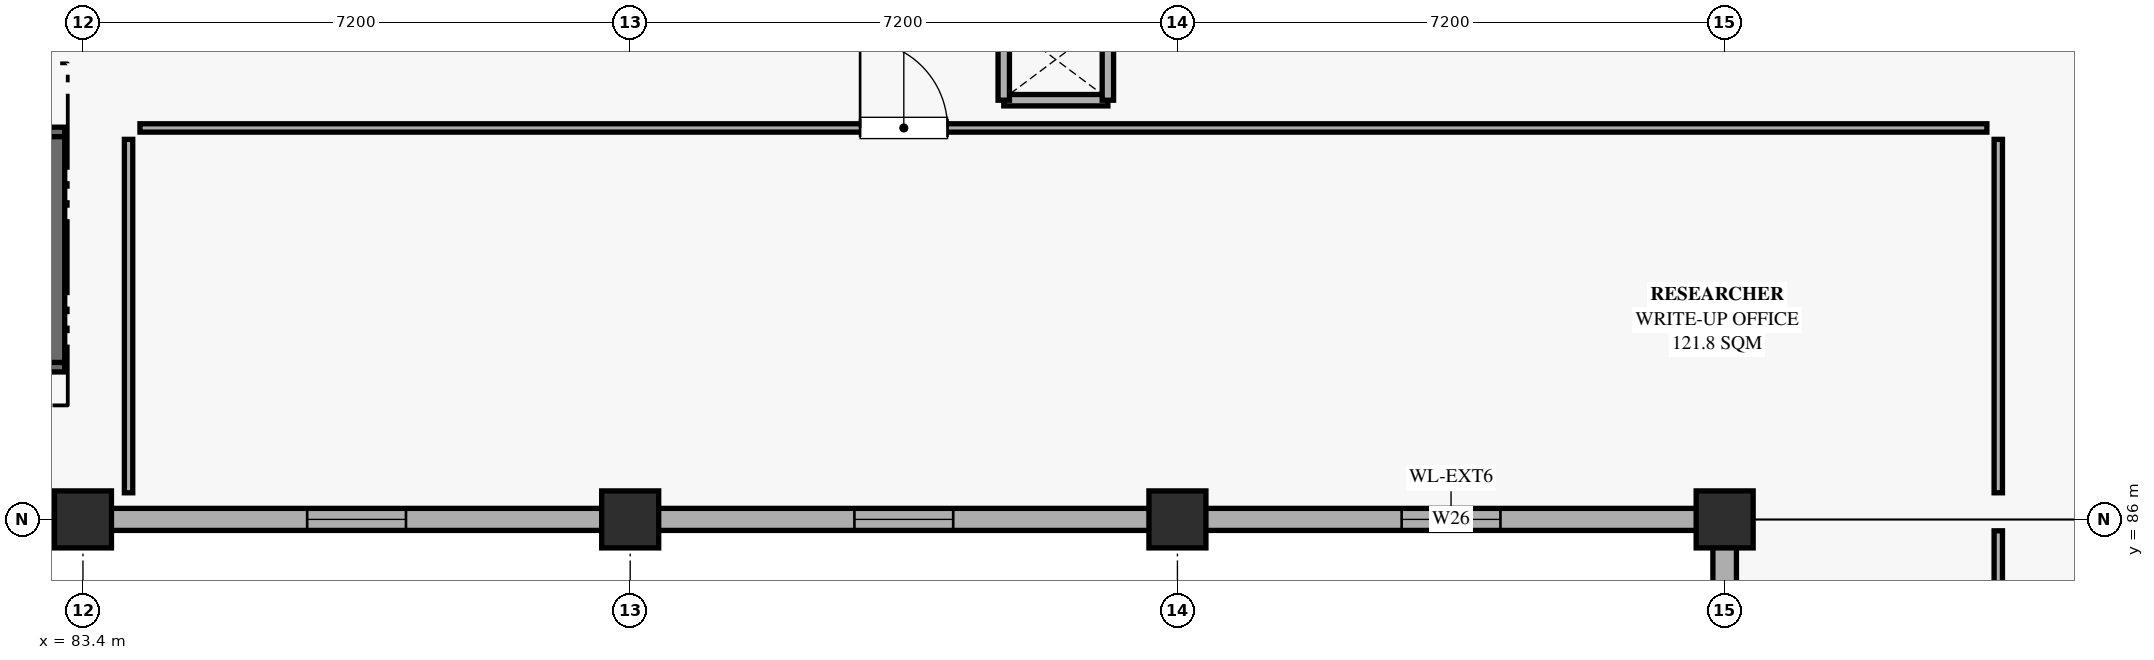
"""IFC4 building model, lengths in metres.
Left out: names, types, materials, properties, quantities, classifications, styles, units other than length and angle.
Written with IfcOpenShell. Run it as: python <this file> out.ifc"""

import sys

from ifc_helpers import new_model, si_unit, direction, frame, frame_2d, origin, origin_2d, place, context, subcontext, project, spatial, rectangle, extrude, element, fill, save


model = new_model("IFC4")
c1 = context("Model", 3, precision=1e-05, world=origin(), true_north=direction((0.0, 1.0)))
c2 = subcontext(c1, "Body", "Model", "MODEL_VIEW")
j1 = project(units=[si_unit("LENGTHUNIT", "METRE"), si_unit("PLANEANGLEUNIT", "RADIAN")], contexts=[c1])
p1 = place(None, origin())
s1 = spatial("IfcSite", under=j1, at=p1, CompositionType="ELEMENT")
p2 = place(p1, origin())
s2 = spatial("IfcBuilding", under=s1, at=p2, CompositionType="ELEMENT")
p3 = place(p2, frame((0.0, 0.0, 19.8)))
s3 = spatial("IfcBuildingStorey", under=s2, at=p3, CompositionType="ELEMENT", Elevation=19.8)
for number, where, z_axis, x_axis in (
    (1, (83.4, 86.0, 0.0), (0.0, 0.0, 1.0), (1.0, 0.0, 0.0)),
    (2, (90.6, 86.0, 0.0), (0.0, 0.0, 1.0), (1.0, 0.0, 0.0)),
    (3, (97.8, 86.0, 0.0), (0.0, 0.0, 1.0), (1.0, 0.0, 0.0)),
    (4, (105.0, 86.0, 0.0), (0.0, 0.0, 1.0), (1.0, 0.0, 0.0)),
):
    element("IfcColumn", number, at=place(p3, frame(where, z_axis=z_axis, x_axis=x_axis)), inside=s3, PredefinedType="COLUMN", context=c2, shape_type="SweptSolid", body=[
        extrude(rectangle(XDim=0.75, YDim=0.75, at=origin_2d()), origin(), (0.0, 0.0, 1.0), 4.5),
    ])
p4 = place(p3, frame((105.0, 79.16, 0.0), z_axis=(0.0, 0.0, 1.0), x_axis=(0.0, 1.0, 0.0)))
e5 = element("IfcWall", 5, at=p4, inside=s3, PredefinedType="SOLIDWALL", context=c2, shape_type="SweptSolid", body=[
    extrude(rectangle(XDim=6.48, YDim=0.31, at=frame_2d((3.24, 0.0))), origin(), (0.0, 0.0, 1.0), 3.0),
])
p5 = place(p4, frame((2.29, 0.0, 0.85)))
e6 = element("IfcOpeningElement", 6, at=p5, cuts=e5, PredefinedType="OPENING", context=c2, shape_type="SweptSolid", body=[
    extrude(rectangle(XDim=1.9, YDim=2.0, at=frame_2d((0.95, 1.0))), frame((0.0, 0.165, 0.0), z_axis=(0.0, -1.0, 0.0), x_axis=(1.0, 0.0, 0.0)), (0.0, 0.0, 1.0), 0.33),
])
p6 = place(p3, frame((104.64, 86.0, 0.0), z_axis=(0.0, 0.0, 1.0), x_axis=(-1.0, 0.0, 0.0)))
e7 = element("IfcWall", 7, at=p6, inside=s3, PredefinedType="SOLIDWALL", context=c2, shape_type="SweptSolid", body=[
    extrude(rectangle(XDim=6.48, YDim=0.29, at=frame_2d((3.24, 0.0))), origin(), (0.0, 0.0, 1.0), 3.0),
])
p7 = place(p6, frame((2.59, 0.0, 0.85)))
e8 = element("IfcOpeningElement", 8, at=p7, cuts=e7, PredefinedType="OPENING", context=c2, shape_type="SweptSolid", body=[
    extrude(rectangle(XDim=1.3, YDim=1.9, at=frame_2d((0.65, 0.95))), frame((0.0, 0.155, 0.0), z_axis=(0.0, -1.0, 0.0), x_axis=(1.0, 0.0, 0.0)), (0.0, 0.0, 1.0), 0.31),
])
p8 = place(p3, frame((97.44, 86.0, 0.0), z_axis=(0.0, 0.0, 1.0), x_axis=(-1.0, 0.0, 0.0)))
e9 = element("IfcWall", 9, at=p8, inside=s3, PredefinedType="SOLIDWALL", context=c2, shape_type="SweptSolid", body=[
    extrude(rectangle(XDim=6.48, YDim=0.29, at=frame_2d((3.24, 0.0))), origin(), (0.0, 0.0, 1.0), 3.0),
])
p9 = place(p8, frame((2.59, 0.0, 0.85)))
e10 = element("IfcOpeningElement", 10, at=p9, cuts=e9, PredefinedType="OPENING", context=c2, shape_type="SweptSolid", body=[
    extrude(rectangle(XDim=1.3, YDim=1.9, at=frame_2d((0.65, 0.95))), frame((0.0, 0.155, 0.0), z_axis=(0.0, -1.0, 0.0), x_axis=(1.0, 0.0, 0.0)), (0.0, 0.0, 1.0), 0.31),
])
p10 = place(p3, frame((90.24, 86.0, 0.0), z_axis=(0.0, 0.0, 1.0), x_axis=(-1.0, 0.0, 0.0)))
e11 = element("IfcWall", 11, at=p10, inside=s3, PredefinedType="SOLIDWALL", context=c2, shape_type="SweptSolid", body=[
    extrude(rectangle(XDim=6.48, YDim=0.29, at=frame_2d((3.24, 0.0))), origin(), (0.0, 0.0, 1.0), 3.0),
])
p11 = place(p10, frame((2.59, 0.0, 0.85)))
e12 = element("IfcOpeningElement", 12, at=p11, cuts=e11, PredefinedType="OPENING", context=c2, shape_type="SweptSolid", body=[
    extrude(rectangle(XDim=1.3, YDim=1.9, at=frame_2d((0.65, 0.95))), frame((0.0, 0.155, 0.0), z_axis=(0.0, -1.0, 0.0), x_axis=(1.0, 0.0, 0.0)), (0.0, 0.0, 1.0), 0.31),
])
p12 = place(p3, frame((83.04, 86.0, 0.0), z_axis=(0.0, 0.0, 1.0), x_axis=(-1.0, 0.0, 0.0)))
e13 = element("IfcWall", 13, at=p12, inside=s3, PredefinedType="SOLIDWALL", context=c2, shape_type="SweptSolid", body=[
    extrude(rectangle(XDim=6.48, YDim=0.29, at=frame_2d((3.24, 0.0))), origin(), (0.0, 0.0, 1.0), 3.0),
])
p13 = place(p12, frame((2.59, 0.0, 0.85)))
e14 = element("IfcOpeningElement", 14, at=p13, cuts=e13, PredefinedType="OPENING", context=c2, shape_type="SweptSolid", body=[
    extrude(rectangle(XDim=1.3, YDim=1.9, at=frame_2d((0.65, 0.95))), frame((0.0, 0.155, 0.0), z_axis=(0.0, -1.0, 0.0), x_axis=(1.0, 0.0, 0.0)), (0.0, 0.0, 1.0), 0.31),
])
p14 = place(p3, frame((96.885, 91.515, 0.0), z_axis=(0.0, 0.0, 1.0), x_axis=(-1.0, 0.0, 0.0)))
e15 = element("IfcWall", 15, at=p14, inside=s3, PredefinedType="PARTITIONING", context=c2, shape_type="SweptSolid", body=[
    extrude(rectangle(XDim=1.37, YDim=0.15, at=frame_2d((0.685, 0.0))), origin(), (0.0, 0.0, 1.0), 2.98),
])
for number, where, z_axis, x_axis in (
    (16, (95.515, 91.515, 0.0), (0.0, 0.0, 1.0), (0.0, 1.0, 0.0)),
    (17, (96.885, 92.585, 0.0), (0.0, 0.0, 1.0), (0.0, -1.0, 0.0)),
):
    element("IfcWall", number, at=place(p3, frame(where, z_axis=z_axis, x_axis=x_axis)), inside=s3, PredefinedType="PARTITIONING", context=c2, shape_type="SweptSolid", body=[
        extrude(rectangle(XDim=1.07, YDim=0.15, at=frame_2d((0.535, 0.0))), origin(), (0.0, 0.0, 1.0), 2.98),
    ])
p15 = place(p3, frame((83.16, 88.065, 0.0), z_axis=(0.0, 0.0, 1.0), x_axis=(-1.0, 0.0, 0.0)))
e18 = element("IfcWall", 18, at=p15, inside=s3, PredefinedType="SHEAR", context=c2, shape_type="SweptSolid", body=[
    extrude(rectangle(XDim=2.62, YDim=0.25, at=frame_2d((1.31, 0.0))), origin(), (0.0, 0.0, 1.0), 4.23),
])
p16 = place(p3, frame((80.54, 91.035, 0.0), z_axis=(0.0, 0.0, 1.0), x_axis=(1.0, 0.0, 0.0)))
e19 = element("IfcWall", 19, at=p16, inside=s3, PredefinedType="SHEAR", context=c2, shape_type="SweptSolid", body=[
    extrude(rectangle(XDim=2.62, YDim=0.25, at=frame_2d((1.31, 0.0))), origin(), (0.0, 0.0, 1.0), 4.23),
])
p17 = place(p16, frame((0.76, 0.0, 0.0)))
e20 = element("IfcOpeningElement", 20, at=p17, cuts=e19, PredefinedType="OPENING", context=c2, shape_type="SweptSolid", body=[
    extrude(rectangle(XDim=1.1, YDim=2.2, at=frame_2d((0.55, 1.1))), frame((0.0, 0.135, 0.0), z_axis=(0.0, -1.0, 0.0), x_axis=(1.0, 0.0, 0.0)), (0.0, 0.0, 1.0), 0.27),
])
p18 = place(p3, frame((83.035, 91.035, 0.0), z_axis=(0.0, 0.0, 1.0), x_axis=(0.0, -1.0, 0.0)))
e21 = element("IfcWall", 21, at=p18, inside=s3, PredefinedType="SHEAR", context=c2, shape_type="SweptSolid", body=[
    extrude(rectangle(XDim=2.97, YDim=0.25, at=frame_2d((1.485, 0.0))), origin(), (0.0, 0.0, 1.0), 4.23),
])
p19 = place(p3, frame((108.6, 85.85, 0.0), z_axis=(0.0, 0.0, 1.0), x_axis=(0.0, -1.0, 0.0)))
e22 = element("IfcWall", 22, at=p19, inside=s3, PredefinedType="PARTITIONING", context=c2, shape_type="SweptSolid", body=[
    extrude(rectangle(XDim=21.3, YDim=0.11, at=frame_2d((10.65, 0.0))), origin(), (0.0, 0.0, 1.0), 2.98),
])
p20 = place(p19, frame((10.095, 0.0, 0.0)))
e23 = element("IfcOpeningElement", 23, at=p20, cuts=e22, PredefinedType="OPENING", context=c2, shape_type="SweptSolid", body=[
    extrude(rectangle(XDim=1.11, YDim=2.1, at=frame_2d((0.555, 1.05))), frame((0.0, 0.065, 0.0), z_axis=(0.0, -1.0, 0.0), x_axis=(1.0, 0.0, 0.0)), (0.0, 0.0, 1.0), 0.13),
])
p21 = place(p3, frame((84.15, 91.15, 0.0), z_axis=(0.0, 0.0, 1.0), x_axis=(1.0, 0.0, 0.0)))
e24 = element("IfcWall", 24, at=p21, inside=s3, PredefinedType="PARTITIONING", context=c2, shape_type="SweptSolid", body=[
    extrude(rectangle(XDim=24.3, YDim=0.11, at=frame_2d((12.15, 0.0))), origin(), (0.0, 0.0, 1.0), 2.98),
])
p22 = place(p21, frame((9.475, 0.0, 0.0)))
e25 = element("IfcOpeningElement", 25, at=p22, cuts=e24, PredefinedType="OPENING", context=c2, shape_type="SweptSolid", body=[
    extrude(rectangle(XDim=1.15, YDim=2.05, at=frame_2d((0.575, 1.025))), frame((0.0, 0.065, 0.0), z_axis=(0.0, -1.0, 0.0), x_axis=(1.0, 0.0, 0.0)), (0.0, 0.0, 1.0), 0.13),
])
for number, where, z_axis, x_axis in (
    (26, (84.0, 86.35, 0.0), (0.0, 0.0, 1.0), (0.0, 1.0, 0.0)),
    (27, (108.6, 91.0, 0.0), (0.0, 0.0, 1.0), (0.0, -1.0, 0.0)),
):
    element("IfcWall", number, at=place(p3, frame(where, z_axis=z_axis, x_axis=x_axis)), inside=s3, PredefinedType="PARTITIONING", context=c2, shape_type="SweptSolid", body=[
        extrude(rectangle(XDim=4.65, YDim=0.11, at=frame_2d((2.325, 0.0))), origin(), (0.0, 0.0, 1.0), 2.98),
    ])
p23 = place(p7, origin())
e28 = element("IfcWindow", 28, at=p23, inside=s3, PartitioningType="SINGLE_PANEL", PredefinedType="WINDOW", context=c2, shape_type="SweptSolid", body=[
    extrude(rectangle(XDim=1.3, YDim=1.9, at=frame_2d((0.65, 0.95))), frame((0.0, 0.03, 0.0), z_axis=(0.0, -1.0, 0.0), x_axis=(1.0, 0.0, 0.0)), (0.0, 0.0, 1.0), 0.06),
])
fill(e8, e28)
p24 = place(p9, origin())
e29 = element("IfcWindow", 29, at=p24, inside=s3, PartitioningType="SINGLE_PANEL", PredefinedType="WINDOW", context=c2, shape_type="SweptSolid", body=[
    extrude(rectangle(XDim=1.3, YDim=1.9, at=frame_2d((0.65, 0.95))), frame((0.0, 0.03, 0.0), z_axis=(0.0, -1.0, 0.0), x_axis=(1.0, 0.0, 0.0)), (0.0, 0.0, 1.0), 0.06),
])
fill(e10, e29)
p25 = place(p11, origin())
e30 = element("IfcWindow", 30, at=p25, inside=s3, PartitioningType="SINGLE_PANEL", PredefinedType="WINDOW", context=c2, shape_type="SweptSolid", body=[
    extrude(rectangle(XDim=1.3, YDim=1.9, at=frame_2d((0.65, 0.95))), frame((0.0, 0.03, 0.0), z_axis=(0.0, -1.0, 0.0), x_axis=(1.0, 0.0, 0.0)), (0.0, 0.0, 1.0), 0.06),
])
fill(e12, e30)
p26 = place(p22, origin())
e31 = element("IfcDoor", 31, at=p26, inside=s3, OperationType="SINGLE_SWING_LEFT", PredefinedType="DOOR", context=c2, shape_type="SweptSolid", body=[
    extrude(rectangle(XDim=1.15, YDim=2.05, at=frame_2d((0.575, 1.025))), frame((0.0, 0.025, 0.0), z_axis=(0.0, -1.0, 0.0), x_axis=(1.0, 0.0, 0.0)), (0.0, 0.0, 1.0), 0.05),
])
fill(e25, e31)
save(model, sys.argv[1])
